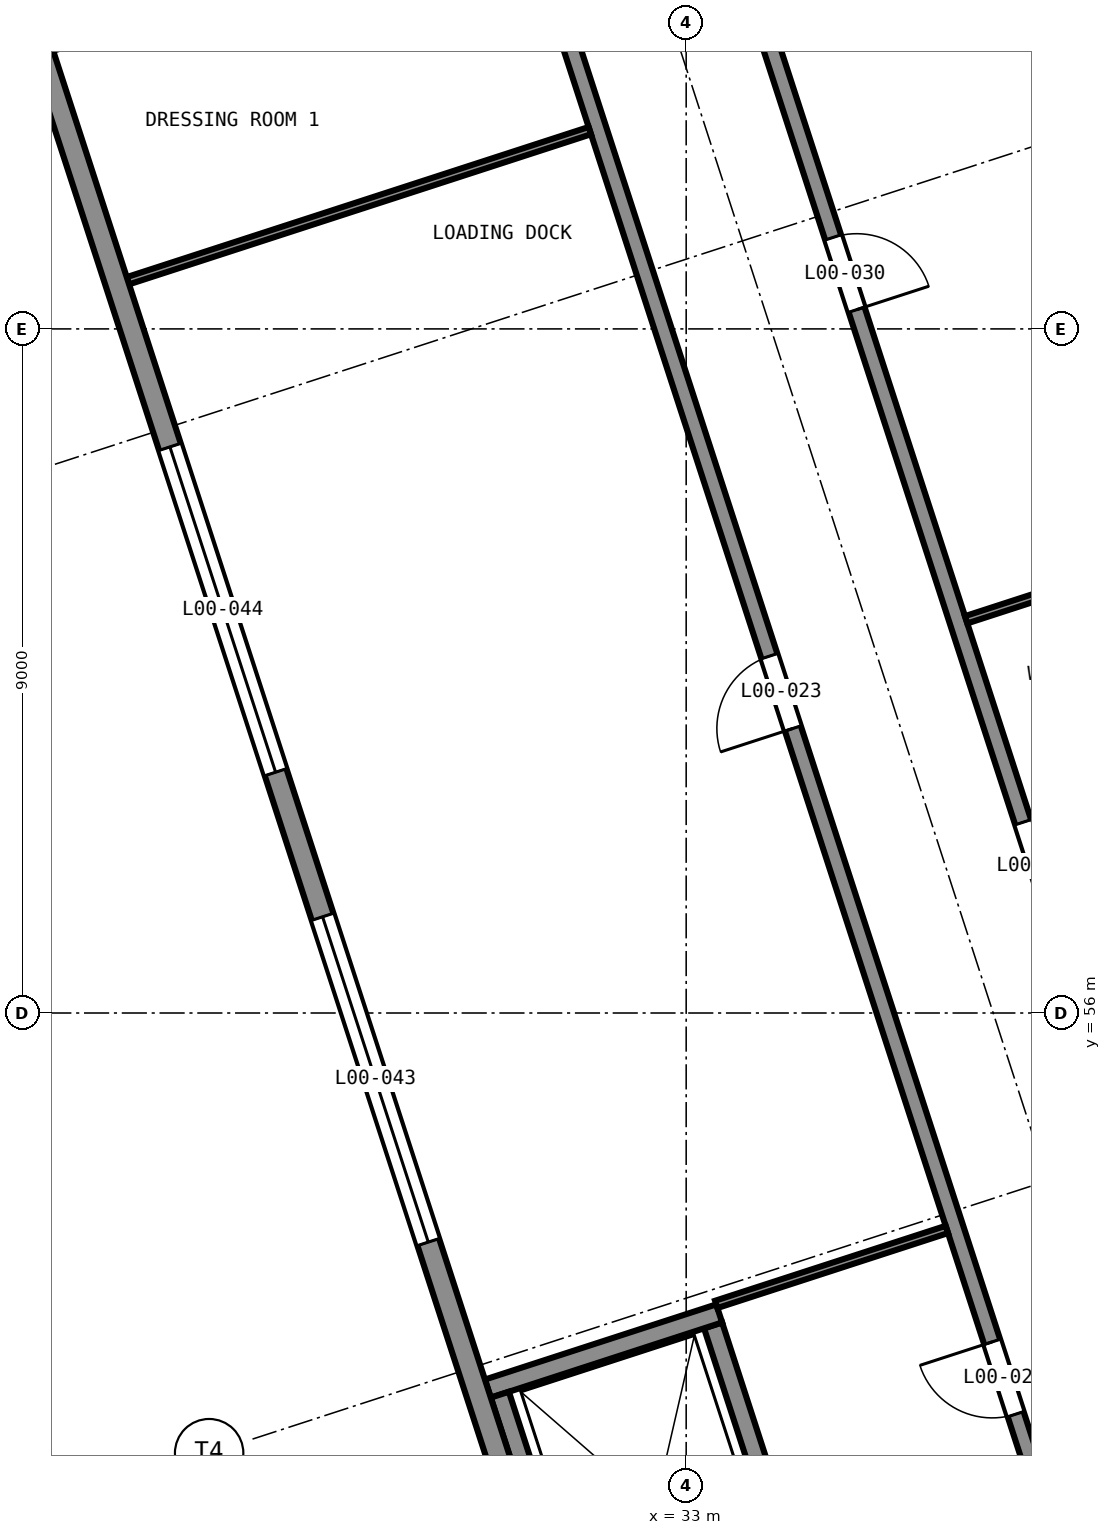
"""IFC4 building model, lengths in metres.
Left out: names, types, materials, properties, quantities, classifications, styles, units other than length and angle.
Written with IfcOpenShell. Run it as: python <this file> out.ifc"""

import sys

from ifc_helpers import new_model, si_unit, direction, frame, frame_2d, origin, place, context, subcontext, project, spatial, rectangle, extrude, element, fill, save


model = new_model("IFC4")
c1 = context("Model", 3, precision=1e-05, world=origin(), true_north=direction((0.0, 1.0)))
c2 = subcontext(c1, "Body", "Model", "MODEL_VIEW")
j1 = project(units=[si_unit("LENGTHUNIT", "METRE"), si_unit("PLANEANGLEUNIT", "RADIAN")], contexts=[c1])
p1 = place(None, origin())
s1 = spatial("IfcSite", under=j1, at=p1, CompositionType="ELEMENT")
p2 = place(p1, origin())
s2 = spatial("IfcBuilding", under=s1, at=p2, CompositionType="ELEMENT")
p3 = place(p2, origin())
s3 = spatial("IfcBuildingStorey", under=s2, at=p3, CompositionType="ELEMENT", Elevation=0.0)
p4 = place(p3, frame((33.501, 41.003, 0.0), z_axis=(0.0, 0.0, 1.0), x_axis=(-0.309017194826, 0.951056451165, 0.0)))
e1 = element("IfcWall", 1, at=p4, inside=s3, PredefinedType="SOLIDWALL", context=c2, shape_type="SweptSolid", body=[
    extrude(rectangle(XDim=53.7, YDim=0.3, at=frame_2d((26.85, 0.0))), origin(), (0.0, 0.0, 1.0), 5.5),
])
p5 = place(p4, frame((31.55, 0.0, 0.9)))
e2 = element("IfcOpeningElement", 2, at=p5, cuts=e1, PredefinedType="OPENING", context=c2, shape_type="SweptSolid", body=[
    extrude(rectangle(XDim=3.6, YDim=2.1, at=frame_2d((1.8, 1.05))), frame((0.0, 0.16, 0.0), z_axis=(0.0, -1.0, 0.0), x_axis=(1.0, 0.0, 0.0)), (0.0, 0.0, 1.0), 0.32),
])
p6 = place(p4, frame((3.0, 0.0, 0.0)))
e3 = element("IfcOpeningElement", 3, at=p6, cuts=e1, PredefinedType="OPENING", context=c2, shape_type="SweptSolid", body=[
    extrude(rectangle(XDim=1.1, YDim=2.1, at=frame_2d((0.55, 1.05))), frame((0.0, 0.16, 0.0), z_axis=(0.0, -1.0, 0.0), x_axis=(1.0, 0.0, 0.0)), (0.0, 0.0, 1.0), 0.32),
])
p7 = place(p4, frame((12.6, 0.0, 0.0)))
e4 = element("IfcOpeningElement", 4, at=p7, cuts=e1, PredefinedType="OPENING", context=c2, shape_type="SweptSolid", body=[
    extrude(rectangle(XDim=4.5, YDim=4.5, at=frame_2d((2.25, 2.25))), frame((0.0, 0.16, 0.0), z_axis=(0.0, -1.0, 0.0), x_axis=(1.0, 0.0, 0.0)), (0.0, 0.0, 1.0), 0.32),
])
p8 = place(p4, frame((19.1, 0.0, 0.0)))
e5 = element("IfcOpeningElement", 5, at=p8, cuts=e1, PredefinedType="OPENING", context=c2, shape_type="SweptSolid", body=[
    extrude(rectangle(XDim=4.5, YDim=4.5, at=frame_2d((2.25, 2.25))), frame((0.0, 0.16, 0.0), z_axis=(0.0, -1.0, 0.0), x_axis=(1.0, 0.0, 0.0)), (0.0, 0.0, 1.0), 0.32),
])
p9 = place(p3, frame((34.621, 47.991, 0.0), z_axis=(0.0, 0.0, 1.0), x_axis=(-0.309055103076, 0.951044133184, 0.0)))
e6 = element("IfcWall", 6, at=p9, inside=s3, PredefinedType="SHEAR", context=c2, shape_type="SweptSolid", body=[
    extrude(rectangle(XDim=4.1, YDim=0.25, at=frame_2d((2.05, 0.0))), origin(), (0.0, 0.0, 1.0), 5.5),
])
p10 = place(p3, frame((33.434, 52.048, 0.0), z_axis=(0.0, 0.0, 1.0), x_axis=(-0.951066581729, -0.308986014439, 0.0)))
e7 = element("IfcWall", 7, at=p10, inside=s3, PredefinedType="SHEAR", context=c2, shape_type="SweptSolid", body=[
    extrude(rectangle(XDim=3.2, YDim=0.25, at=frame_2d((1.6, 0.0))), origin(), (0.0, 0.0, 1.0), 5.5),
])
p11 = place(p3, frame((30.548, 50.979, 0.0), z_axis=(0.0, 0.0, 1.0), x_axis=(0.309055103076, -0.951044133184, 0.0)))
e8 = element("IfcWall", 8, at=p11, inside=s3, PredefinedType="SHEAR", context=c2, shape_type="SweptSolid", body=[
    extrude(rectangle(XDim=4.1, YDim=0.25, at=frame_2d((2.05, 0.0))), origin(), (0.0, 0.0, 1.0), 5.5),
])
p12 = place(p3, frame((37.956, 48.812, 0.0), z_axis=(0.0, 0.0, 1.0), x_axis=(-0.30901736393, 0.951056396219, 0.0)))
e9 = element("IfcWall", 9, at=p12, inside=s3, PredefinedType="SOLIDWALL", context=c2, shape_type="SweptSolid", body=[
    extrude(rectangle(XDim=41.7, YDim=0.22, at=frame_2d((20.85, 0.0))), origin(), (0.0, 0.0, 1.0), 5.2),
])
p13 = place(p12, frame((2.009, 0.0, 0.0)))
e10 = element("IfcOpeningElement", 10, at=p13, cuts=e9, PredefinedType="OPENING", context=c2, shape_type="SweptSolid", body=[
    extrude(rectangle(XDim=1.0, YDim=2.1, at=frame_2d((0.5, 1.05))), frame((0.0, 0.12, 0.0), z_axis=(0.0, -1.0, 0.0), x_axis=(1.0, 0.0, 0.0)), (0.0, 0.0, 1.0), 0.24),
])
p14 = place(p12, frame((11.495, 0.0, 0.0)))
e11 = element("IfcOpeningElement", 11, at=p14, cuts=e9, PredefinedType="OPENING", context=c2, shape_type="SweptSolid", body=[
    extrude(rectangle(XDim=1.0, YDim=2.1, at=frame_2d((0.5, 1.05))), frame((0.0, 0.12, 0.0), z_axis=(0.0, -1.0, 0.0), x_axis=(1.0, 0.0, 0.0)), (0.0, 0.0, 1.0), 0.24),
])
p15 = place(p12, frame((21.7, 0.0, 0.0)))
e12 = element("IfcOpeningElement", 12, at=p15, cuts=e9, PredefinedType="OPENING", context=c2, shape_type="SweptSolid", body=[
    extrude(rectangle(XDim=1.2, YDim=2.1, at=frame_2d((0.6, 1.05))), frame((0.0, 0.12, 0.0), z_axis=(0.0, -1.0, 0.0), x_axis=(1.0, 0.0, 0.0)), (0.0, 0.0, 1.0), 0.24),
])
p16 = place(p12, frame((26.7, 0.0, 0.0)))
e13 = element("IfcOpeningElement", 13, at=p16, cuts=e9, PredefinedType="OPENING", context=c2, shape_type="SweptSolid", body=[
    extrude(rectangle(XDim=1.2, YDim=2.1, at=frame_2d((0.6, 1.05))), frame((0.0, 0.12, 0.0), z_axis=(0.0, -1.0, 0.0), x_axis=(1.0, 0.0, 0.0)), (0.0, 0.0, 1.0), 0.24),
])
p17 = place(p12, frame((31.739, 0.0, 0.0)))
e14 = element("IfcOpeningElement", 14, at=p17, cuts=e9, PredefinedType="OPENING", context=c2, shape_type="SweptSolid", body=[
    extrude(rectangle(XDim=1.2, YDim=2.1, at=frame_2d((0.6, 1.05))), frame((0.0, 0.12, 0.0), z_axis=(0.0, -1.0, 0.0), x_axis=(1.0, 0.0, 0.0)), (0.0, 0.0, 1.0), 0.24),
])
p18 = place(p3, frame((40.333, 49.584, 0.0), z_axis=(0.0, 0.0, 1.0), x_axis=(-0.309015643281, 0.951056955291, 0.0)))
e15 = element("IfcWall", 15, at=p18, inside=s3, PredefinedType="SOLIDWALL", context=c2, shape_type="SweptSolid", body=[
    extrude(rectangle(XDim=41.7, YDim=0.22, at=frame_2d((20.85, 0.0))), origin(), (0.0, 0.0, 1.0), 5.2),
])
p19 = place(p18, frame((1.9, 0.0, 0.0)))
e16 = element("IfcOpeningElement", 16, at=p19, cuts=e15, PredefinedType="OPENING", context=c2, shape_type="SweptSolid", body=[
    extrude(rectangle(XDim=1.2, YDim=2.1, at=frame_2d((0.6, 1.05))), frame((0.0, 0.12, 0.0), z_axis=(0.0, -1.0, 0.0), x_axis=(1.0, 0.0, 0.0)), (0.0, 0.0, 1.0), 0.24),
])
p20 = place(p18, frame((8.185, 0.0, 0.0)))
e17 = element("IfcOpeningElement", 17, at=p20, cuts=e15, PredefinedType="OPENING", context=c2, shape_type="SweptSolid", body=[
    extrude(rectangle(XDim=1.2, YDim=2.1, at=frame_2d((0.6, 1.05))), frame((0.0, 0.12, 0.0), z_axis=(0.0, -1.0, 0.0), x_axis=(1.0, 0.0, 0.0)), (0.0, 0.0, 1.0), 0.24),
])
p21 = place(p18, frame((16.475, 0.0, 0.0)))
e18 = element("IfcOpeningElement", 18, at=p21, cuts=e15, PredefinedType="OPENING", context=c2, shape_type="SweptSolid", body=[
    extrude(rectangle(XDim=1.0, YDim=2.1, at=frame_2d((0.5, 1.05))), frame((0.0, 0.12, 0.0), z_axis=(0.0, -1.0, 0.0), x_axis=(1.0, 0.0, 0.0)), (0.0, 0.0, 1.0), 0.24),
])
p22 = place(p18, frame((23.05, 0.0, 0.0)))
e19 = element("IfcOpeningElement", 19, at=p22, cuts=e15, PredefinedType="OPENING", context=c2, shape_type="SweptSolid", body=[
    extrude(rectangle(XDim=1.0, YDim=2.1, at=frame_2d((0.5, 1.05))), frame((0.0, 0.12, 0.0), z_axis=(0.0, -1.0, 0.0), x_axis=(1.0, 0.0, 0.0)), (0.0, 0.0, 1.0), 0.24),
])
p23 = place(p18, frame((27.3, 0.0, 0.0)))
e20 = element("IfcOpeningElement", 20, at=p23, cuts=e15, PredefinedType="OPENING", context=c2, shape_type="SweptSolid", body=[
    extrude(rectangle(XDim=1.0, YDim=2.1, at=frame_2d((0.5, 1.05))), frame((0.0, 0.12, 0.0), z_axis=(0.0, -1.0, 0.0), x_axis=(1.0, 0.0, 0.0)), (0.0, 0.0, 1.0), 0.24),
])
p24 = place(p18, frame((32.761, 0.0, 0.0)))
e21 = element("IfcOpeningElement", 21, at=p24, cuts=e15, PredefinedType="OPENING", context=c2, shape_type="SweptSolid", body=[
    extrude(rectangle(XDim=1.0, YDim=2.1, at=frame_2d((0.5, 1.05))), frame((0.0, 0.12, 0.0), z_axis=(0.0, -1.0, 0.0), x_axis=(1.0, 0.0, 0.0)), (0.0, 0.0, 1.0), 0.24),
])
p25 = place(p3, frame((33.396, 52.167, 0.0), z_axis=(0.0, 0.0, 1.0), x_axis=(0.951044192343, 0.309054921027, 0.0)))
e22 = element("IfcWall", 22, at=p25, inside=s3, PredefinedType="PARTITIONING", context=c2, shape_type="SweptSolid", body=[
    extrude(rectangle(XDim=3.19, YDim=0.1, at=frame_2d((1.595, 0.0))), origin(), (0.0, 0.0, 1.0), 5.2),
])
p26 = place(p3, frame((36.683, 61.173, 0.0), z_axis=(0.0, 0.0, 1.0), x_axis=(0.95105616864, 0.309018064344, 0.0)))
e23 = element("IfcWall", 23, at=p26, inside=s3, PredefinedType="PARTITIONING", context=c2, shape_type="SweptSolid", body=[
    extrude(rectangle(XDim=4.14, YDim=0.1, at=frame_2d((2.07, 0.0))), origin(), (0.0, 0.0, 1.0), 5.2),
])
p27 = place(p3, frame((25.655, 65.634, 0.0), z_axis=(0.0, 0.0, 1.0), x_axis=(0.951055405517, 0.309020412977, 0.0)))
e24 = element("IfcWall", 24, at=p27, inside=s3, PredefinedType="PARTITIONING", context=c2, shape_type="SweptSolid", body=[
    extrude(rectangle(XDim=6.39, YDim=0.1, at=frame_2d((3.195, 0.0))), origin(), (0.0, 0.0, 1.0), 5.2),
])
p28 = place(p13, origin())
e25 = element("IfcDoor", 25, at=p28, inside=s3, OperationType="SINGLE_SWING_LEFT", PredefinedType="DOOR", context=c2, shape_type="SweptSolid", body=[
    extrude(rectangle(XDim=1.0, YDim=2.1, at=frame_2d((0.5, 1.05))), frame((0.0, 0.025, 0.0), z_axis=(0.0, -1.0, 0.0), x_axis=(1.0, 0.0, 0.0)), (0.0, 0.0, 1.0), 0.05),
])
fill(e10, e25)
p29 = place(p14, origin())
e26 = element("IfcDoor", 26, at=p29, inside=s3, OperationType="SINGLE_SWING_RIGHT", PredefinedType="DOOR", context=c2, shape_type="SweptSolid", body=[
    extrude(rectangle(XDim=1.0, YDim=2.1, at=frame_2d((0.5, 1.05))), frame((0.0, 0.025, 0.0), z_axis=(0.0, -1.0, 0.0), x_axis=(1.0, 0.0, 0.0)), (0.0, 0.0, 1.0), 0.05),
])
fill(e11, e26)
p30 = place(p20, frame((1.2, 0.0, 0.0), z_axis=(0.0, 0.0, 1.0), x_axis=(-1.0, 0.0, 0.0)))
e27 = element("IfcDoor", 27, at=p30, inside=s3, OperationType="SINGLE_SWING_LEFT", PredefinedType="DOOR", context=c2, shape_type="SweptSolid", body=[
    extrude(rectangle(XDim=1.2, YDim=2.1, at=frame_2d((0.6, 1.05))), frame((0.0, 0.025, 0.0), z_axis=(0.0, -1.0, 0.0), x_axis=(1.0, 0.0, 0.0)), (0.0, 0.0, 1.0), 0.05),
])
fill(e17, e27)
p31 = place(p21, frame((1.0, 0.0, 0.0), z_axis=(0.0, 0.0, 1.0), x_axis=(-1.0, 0.0, 0.0)))
e28 = element("IfcDoor", 28, at=p31, inside=s3, OperationType="SINGLE_SWING_LEFT", PredefinedType="DOOR", context=c2, shape_type="SweptSolid", body=[
    extrude(rectangle(XDim=1.0, YDim=2.1, at=frame_2d((0.5, 1.05))), frame((0.0, 0.025, 0.0), z_axis=(0.0, -1.0, 0.0), x_axis=(1.0, 0.0, 0.0)), (0.0, 0.0, 1.0), 0.05),
])
fill(e18, e28)
p32 = place(p7, origin())
e29 = element("IfcDoor", 29, at=p32, inside=s3, OperationType="ROLLINGUP", PredefinedType="DOOR", context=c2, shape_type="SweptSolid", body=[
    extrude(rectangle(XDim=4.5, YDim=4.5, at=frame_2d((2.25, 2.25))), frame((0.0, 0.025, 0.0), z_axis=(0.0, -1.0, 0.0), x_axis=(1.0, 0.0, 0.0)), (0.0, 0.0, 1.0), 0.05),
])
fill(e4, e29)
p33 = place(p8, origin())
e30 = element("IfcDoor", 30, at=p33, inside=s3, OperationType="ROLLINGUP", PredefinedType="DOOR", context=c2, shape_type="SweptSolid", body=[
    extrude(rectangle(XDim=4.5, YDim=4.5, at=frame_2d((2.25, 2.25))), frame((0.0, 0.025, 0.0), z_axis=(0.0, -1.0, 0.0), x_axis=(1.0, 0.0, 0.0)), (0.0, 0.0, 1.0), 0.05),
])
fill(e5, e30)
save(model, sys.argv[1])
